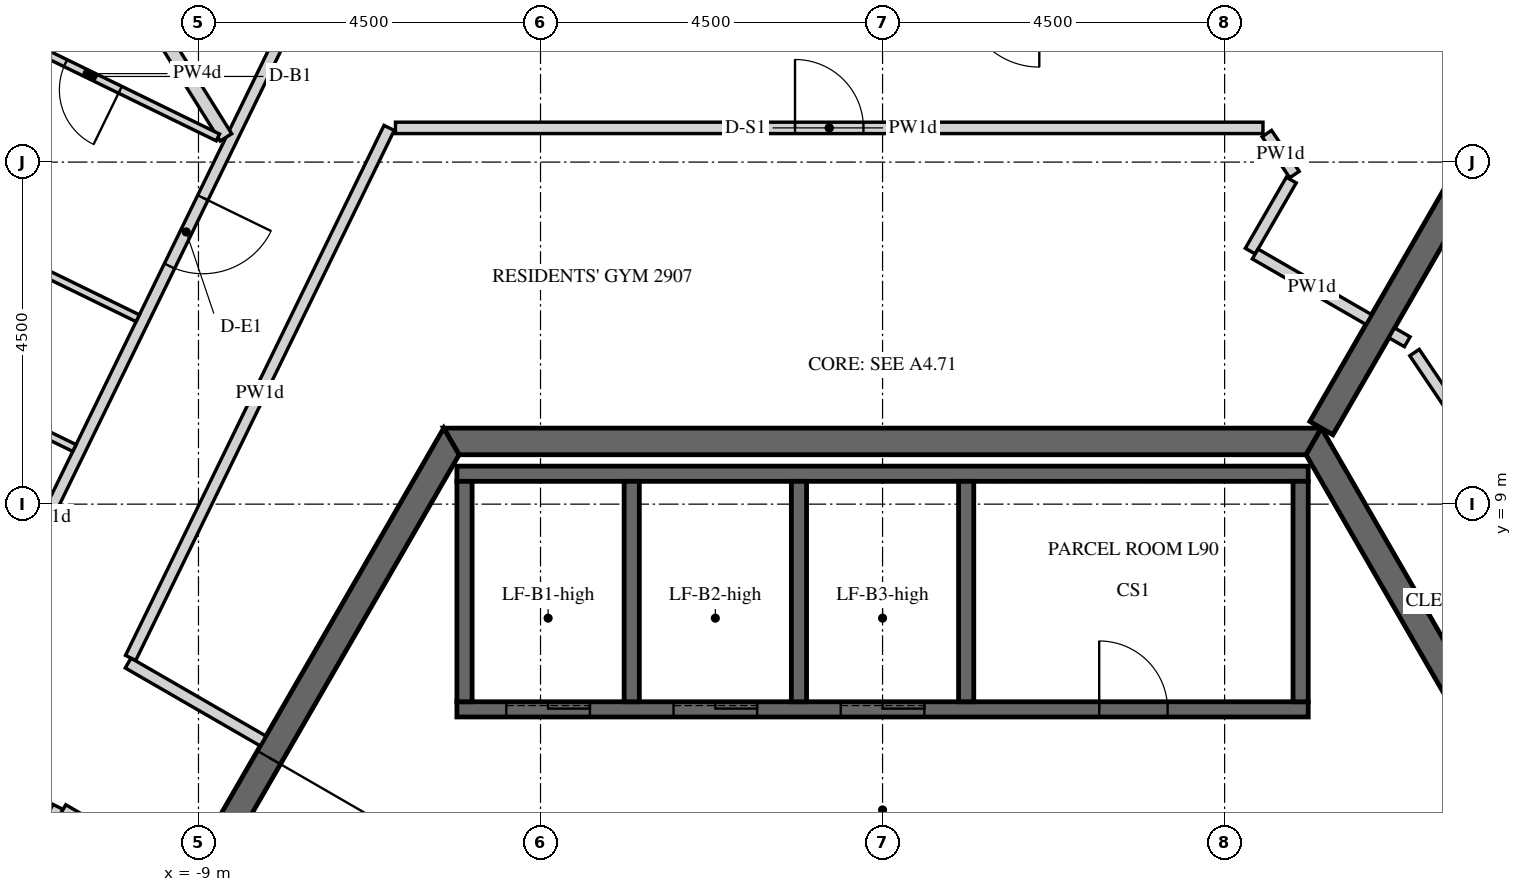
"""IFC4 building model, lengths in metres.
Left out: names, types, materials, properties, quantities, classifications, styles, units other than length and angle.
Written with IfcOpenShell. Run it as: python <this file> out.ifc"""

import sys

from ifc_helpers import new_model, si_unit, direction, frame, frame_2d, origin, place, context, subcontext, project, spatial, polyline, rectangle, outline, extrude, element, fill, save


model = new_model("IFC4")
c1 = context("Model", 3, precision=1e-05, world=origin(), true_north=direction((0.0, 1.0)))
c2 = subcontext(c1, "Body", "Model", "MODEL_VIEW")
j1 = project(units=[si_unit("LENGTHUNIT", "METRE"), si_unit("PLANEANGLEUNIT", "RADIAN")], contexts=[c1])
p1 = place(None, origin())
s1 = spatial("IfcSite", under=j1, at=p1, CompositionType="ELEMENT")
p2 = place(p1, origin())
s2 = spatial("IfcBuilding", under=s1, at=p2, CompositionType="ELEMENT")
p3 = place(p2, frame((0.0, 0.0, 372.9)))
s3 = spatial("IfcBuildingStorey", under=s2, at=p3, CompositionType="ELEMENT", Elevation=372.9)
p4 = place(p3, frame((-5.673, 9.825, -0.15), z_axis=(0.0, 0.0, 1.0), x_axis=(-0.499995046907, -0.866028263435, 0.0)))
e1 = element("IfcWall", 1, at=p4, inside=s3, PredefinedType="SHEAR", context=c2, shape_type="SweptSolid", body=[
    extrude(outline(polyline([(-0.101, -0.175), (11.446, -0.175), (11.244, 0.175), (0.101, 0.175), (-0.101, -0.175)])), origin(), (0.0, 0.0, 1.0), 3.55),
])
p5 = place(p4, frame((4.801, 0.0, 0.15)))
e2 = element("IfcOpeningElement", 2, at=p5, cuts=e1, PredefinedType="OPENING", context=c2, shape_type="SweptSolid", body=[
    extrude(rectangle(XDim=1.8, YDim=2.4, at=frame_2d((0.9, 1.2))), frame((0.0, 0.185, 0.0), z_axis=(0.0, -1.0, 0.0), x_axis=(1.0, 0.0, 0.0)), (0.0, 0.0, 1.0), 0.37),
])
p6 = place(p3, frame((11.345, 0.0, -0.15), z_axis=(0.0, 0.0, 1.0), x_axis=(-0.499995046907, 0.866028263435, 0.0)))
e3 = element("IfcWall", 3, at=p6, inside=s3, PredefinedType="SHEAR", context=c2, shape_type="SweptSolid", body=[
    extrude(outline(polyline([(-0.101, -0.175), (11.446, -0.175), (11.244, 0.175), (0.101, 0.175), (-0.101, -0.175)])), origin(), (0.0, 0.0, 1.0), 3.55),
])
p7 = place(p6, frame((4.744, 0.0, 0.15)))
e4 = element("IfcOpeningElement", 4, at=p7, cuts=e3, PredefinedType="OPENING", context=c2, shape_type="SweptSolid", body=[
    extrude(rectangle(XDim=1.8, YDim=2.4, at=frame_2d((0.9, 1.2))), frame((0.0, 0.185, 0.0), z_axis=(0.0, -1.0, 0.0), x_axis=(1.0, 0.0, 0.0)), (0.0, 0.0, 1.0), 0.37),
])
p8 = place(p3, frame((5.673, 9.825, -0.15), z_axis=(0.0, 0.0, 1.0), x_axis=(-1.0, 0.0, 0.0)))
e5 = element("IfcWall", 5, at=p8, inside=s3, PredefinedType="SHEAR", context=c2, shape_type="SweptSolid", body=[
    extrude(outline(polyline([(-0.101, -0.175), (11.446, -0.175), (11.244, 0.175), (0.101, 0.175), (-0.101, -0.175)])), origin(), (0.0, 0.0, 1.0), 3.55),
])
p9 = place(p3, frame((5.773, 10.0, -0.15), z_axis=(0.0, 0.0, 1.0), x_axis=(0.500007911273, 0.866020836161, 0.0)))
e6 = element("IfcWall", 6, at=p9, inside=s3, PredefinedType="SHEAR", context=c2, shape_type="SweptSolid", body=[
    extrude(rectangle(XDim=14.51, YDim=0.35, at=frame_2d((7.255, 0.0))), origin(), (0.0, 0.0, 1.0), 3.55),
])
p10 = place(p9, frame((6.355, 0.0, 0.15)))
e7 = element("IfcOpeningElement", 7, at=p10, cuts=e6, PredefinedType="OPENING", context=c2, shape_type="SweptSolid", body=[
    extrude(rectangle(XDim=1.8, YDim=2.4, at=frame_2d((0.9, 1.2))), frame((0.0, 0.185, 0.0), z_axis=(0.0, -1.0, 0.0), x_axis=(1.0, 0.0, 0.0)), (0.0, 0.0, 1.0), 0.37),
])
p11 = place(p3, frame((-5.6, 6.3, -0.25), z_axis=(0.0, 0.0, 1.0), x_axis=(1.0, 0.0, 0.0)))
e8 = element("IfcWall", 8, at=p11, inside=s3, PredefinedType="SHEAR", context=c2, shape_type="SweptSolid", body=[
    extrude(rectangle(XDim=11.2, YDim=0.2, at=frame_2d((5.6, 0.0))), origin(), (0.0, 0.0, 1.0), 3.9),
])
p12 = place(p11, frame((8.45, 0.0, 0.25)))
e9 = element("IfcOpeningElement", 9, at=p12, cuts=e8, PredefinedType="OPENING", context=c2, shape_type="SweptSolid", body=[
    extrude(rectangle(XDim=0.9, YDim=2.1, at=frame_2d((0.45, 1.05))), frame((0.0, 0.11, 0.0), z_axis=(0.0, -1.0, 0.0), x_axis=(1.0, 0.0, 0.0)), (0.0, 0.0, 1.0), 0.22),
])
p13 = place(p11, frame((0.65, 0.0, 0.25)))
e10 = element("IfcOpeningElement", 10, at=p13, cuts=e8, PredefinedType="OPENING", context=c2, shape_type="SweptSolid", body=[
    extrude(rectangle(XDim=1.1, YDim=2.1, at=frame_2d((0.55, 1.05))), frame((0.0, 0.11, 0.0), z_axis=(0.0, -1.0, 0.0), x_axis=(1.0, 0.0, 0.0)), (0.0, 0.0, 1.0), 0.22),
])
p14 = place(p11, frame((2.85, 0.0, 0.25)))
e11 = element("IfcOpeningElement", 11, at=p14, cuts=e8, PredefinedType="OPENING", context=c2, shape_type="SweptSolid", body=[
    extrude(rectangle(XDim=1.1, YDim=2.1, at=frame_2d((0.55, 1.05))), frame((0.0, 0.11, 0.0), z_axis=(0.0, -1.0, 0.0), x_axis=(1.0, 0.0, 0.0)), (0.0, 0.0, 1.0), 0.22),
])
p15 = place(p11, frame((5.05, 0.0, 0.25)))
e12 = element("IfcOpeningElement", 12, at=p15, cuts=e8, PredefinedType="OPENING", context=c2, shape_type="SweptSolid", body=[
    extrude(rectangle(XDim=1.1, YDim=2.1, at=frame_2d((0.55, 1.05))), frame((0.0, 0.11, 0.0), z_axis=(0.0, -1.0, 0.0), x_axis=(1.0, 0.0, 0.0)), (0.0, 0.0, 1.0), 0.22),
])
p16 = place(p3, frame((-5.6, 9.4, -0.25), z_axis=(0.0, 0.0, 1.0), x_axis=(1.0, 0.0, 0.0)))
e13 = element("IfcWall", 13, at=p16, inside=s3, PredefinedType="SHEAR", context=c2, shape_type="SweptSolid", body=[
    extrude(rectangle(XDim=11.2, YDim=0.2, at=frame_2d((5.6, 0.0))), origin(), (0.0, 0.0, 1.0), 3.9),
])
for number, where, z_axis, x_axis in (
    (14, (-5.5, 6.4, -0.25), (0.0, 0.0, 1.0), (0.0, 1.0, 0.0)),
    (15, (-3.3, 6.4, -0.25), (0.0, 0.0, 1.0), (0.0, 1.0, 0.0)),
    (16, (-1.1, 6.4, -0.25), (0.0, 0.0, 1.0), (0.0, 1.0, 0.0)),
    (17, (1.1, 6.4, -0.25), (0.0, 0.0, 1.0), (0.0, 1.0, 0.0)),
    (18, (5.5, 6.4, -0.25), (0.0, 0.0, 1.0), (0.0, 1.0, 0.0)),
):
    element("IfcWall", number, at=place(p3, frame(where, z_axis=z_axis, x_axis=x_axis)), inside=s3, PredefinedType="SHEAR", context=c2, shape_type="SweptSolid", body=[
        extrude(rectangle(XDim=2.9, YDim=0.2, at=frame_2d((1.45, 0.0))), origin(), (0.0, 0.0, 1.0), 3.9),
    ])
p17 = place(p3, frame((-7.653, 15.675, 0.0), z_axis=(0.0, 0.0, 1.0), x_axis=(-0.438369669055, -0.898794767037, 0.0)))
e19 = element("IfcWall", 19, at=p17, inside=s3, PredefinedType="PARTITIONING", context=c2, shape_type="SweptSolid", body=[
    extrude(rectangle(XDim=15.243, YDim=0.15, at=frame_2d((7.621, 0.0))), origin(), (0.0, 0.0, 1.0), 2.47),
])
p18 = place(p17, frame((2.942, 0.0, 0.0)))
e20 = element("IfcOpeningElement", 20, at=p18, cuts=e19, PredefinedType="OPENING", context=c2, shape_type="SweptSolid", body=[
    extrude(rectangle(XDim=1.0, YDim=2.1, at=frame_2d((0.5, 1.05))), frame((0.0, 0.085, 0.0), z_axis=(0.0, -1.0, 0.0), x_axis=(1.0, 0.0, 0.0)), (0.0, 0.0, 1.0), 0.17),
])
p19 = place(p3, frame((-8.15, 5.884, 0.0), z_axis=(0.0, 0.0, 1.0), x_axis=(-0.866007146345, 0.50003162148, 0.0)))
e21 = element("IfcWall", 21, at=p19, inside=s3, PredefinedType="PARTITIONING", context=c2, shape_type="SweptSolid", body=[
    extrude(rectangle(XDim=2.051, YDim=0.15, at=frame_2d((1.025, 0.0))), origin(), (0.0, 0.0, 1.0), 2.47),
])
p20 = place(p3, frame((-9.893, 6.977, 0.0), z_axis=(0.0, 0.0, 1.0), x_axis=(0.438380229518, 0.898789616299, 0.0)))
e22 = element("IfcWall", 22, at=p20, inside=s3, PredefinedType="PARTITIONING", context=c2, shape_type="SweptSolid", body=[
    extrude(rectangle(XDim=7.758, YDim=0.15, at=frame_2d((3.879, 0.0))), origin(), (0.0, 0.0, 1.0), 2.47),
])
p21 = place(p3, frame((-6.408, 13.95, 0.0), z_axis=(0.0, 0.0, 1.0), x_axis=(1.0, 0.0, 0.0)))
e23 = element("IfcWall", 23, at=p21, inside=s3, PredefinedType="PARTITIONING", context=c2, shape_type="SweptSolid", body=[
    extrude(rectangle(XDim=11.413, YDim=0.15, at=frame_2d((5.707, 0.0))), origin(), (0.0, 0.0, 1.0), 2.47),
])
p22 = place(p21, frame((5.257, 0.0, 0.0)))
e24 = element("IfcOpeningElement", 24, at=p22, cuts=e23, PredefinedType="OPENING", context=c2, shape_type="SweptSolid", body=[
    extrude(rectangle(XDim=0.9, YDim=2.1, at=frame_2d((0.45, 1.05))), frame((0.0, 0.085, 0.0), z_axis=(0.0, -1.0, 0.0), x_axis=(1.0, 0.0, 0.0)), (0.0, 0.0, 1.0), 0.17),
])
p23 = place(p3, frame((5.055, 13.875, 0.0), z_axis=(0.0, 0.0, 1.0), x_axis=(0.559111656251, -0.829092368705, 0.0)))
e25 = element("IfcWall", 25, at=p23, inside=s3, PredefinedType="PARTITIONING", context=c2, shape_type="SweptSolid", body=[
    extrude(rectangle(XDim=0.65, YDim=0.15, at=frame_2d((0.325, 0.0))), origin(), (0.0, 0.0, 1.0), 2.47),
])
p24 = place(p3, frame((5.377, 13.264, 0.0), z_axis=(0.0, 0.0, 1.0), x_axis=(-0.499957341738, -0.866050031143, 0.0)))
e26 = element("IfcWall", 26, at=p24, inside=s3, PredefinedType="PARTITIONING", context=c2, shape_type="SweptSolid", body=[
    extrude(rectangle(XDim=1.08, YDim=0.15, at=frame_2d((0.54, 0.0))), origin(), (0.0, 0.0, 1.0), 2.47),
])
p25 = place(p3, frame((4.902, 12.291, 0.0), z_axis=(0.0, 0.0, 1.0), x_axis=(0.866074815912, -0.499914405916, 0.0)))
e27 = element("IfcWall", 27, at=p25, inside=s3, PredefinedType="PARTITIONING", context=c2, shape_type="SweptSolid", body=[
    extrude(rectangle(XDim=1.725, YDim=0.15, at=frame_2d((0.862, 0.0))), origin(), (0.0, 0.0, 1.0), 2.47),
])
p26 = place(p3, frame((-13.021, 0.564, 0.0), z_axis=(0.0, 0.0, 1.0), x_axis=(0.438343062662, 0.8988077433, 0.0)))
e28 = element("IfcWall", 28, at=p26, inside=s3, PredefinedType="PARTITIONING", context=c2, shape_type="SweptSolid", body=[
    extrude(rectangle(XDim=4.955, YDim=0.15, at=frame_2d((2.478, 0.0))), origin(), (0.0, 0.0, 1.0), 2.47),
])
p27 = place(p26, frame((2.028, 0.0, 0.0)))
e29 = element("IfcOpeningElement", 29, at=p27, cuts=e28, PredefinedType="OPENING", context=c2, shape_type="SweptSolid", body=[
    extrude(rectangle(XDim=0.9, YDim=2.1, at=frame_2d((0.45, 1.05))), frame((0.0, 0.085, 0.0), z_axis=(0.0, -1.0, 0.0), x_axis=(1.0, 0.0, 0.0)), (0.0, 0.0, 1.0), 0.17),
])
p28 = place(p3, frame((-10.783, 4.98, 0.0), z_axis=(0.0, 0.0, 1.0), x_axis=(0.866007702746, -0.500030657845, 0.0)))
e30 = element("IfcWall", 30, at=p28, inside=s3, PredefinedType="PARTITIONING", context=c2, shape_type="SweptSolid", body=[
    extrude(rectangle(XDim=1.829, YDim=0.15, at=frame_2d((0.914, 0.0))), origin(), (0.0, 0.0, 1.0), 2.47),
])
p29 = place(p3, frame((6.699, 11.254, 0.0), z_axis=(0.0, 0.0, 1.0), x_axis=(0.865544827262, -0.500831460673, 0.0)))
e31 = element("IfcWall", 31, at=p29, inside=s3, PredefinedType="PARTITIONING", context=c2, shape_type="SweptSolid", body=[
    extrude(rectangle(XDim=0.235, YDim=0.15, at=frame_2d((0.117, 0.0))), origin(), (0.0, 0.0, 1.0), 2.47),
])
p30 = place(p3, frame((6.999, 10.994, 0.0), z_axis=(0.0, 0.0, 1.0), x_axis=(0.55918759866, -0.82904115067, 0.0)))
e32 = element("IfcWall", 32, at=p30, inside=s3, PredefinedType="PARTITIONING", context=c2, shape_type="SweptSolid", body=[
    extrude(rectangle(XDim=5.013, YDim=0.15, at=frame_2d((2.506, 0.0))), origin(), (0.0, 0.0, 1.0), 2.47),
])
p31 = place(p30, frame((2.057, 0.0, 0.0)))
e33 = element("IfcOpeningElement", 33, at=p31, cuts=e32, PredefinedType="OPENING", context=c2, shape_type="SweptSolid", body=[
    extrude(rectangle(XDim=0.9, YDim=2.1, at=frame_2d((0.45, 1.05))), frame((0.0, 0.085, 0.0), z_axis=(0.0, -1.0, 0.0), x_axis=(1.0, 0.0, 0.0)), (0.0, 0.0, 1.0), 0.17),
])
p32 = place(p3, frame((-10.402, 16.647, 0.0), z_axis=(0.0, 0.0, 1.0), x_axis=(0.529853827573, -0.84808898201, 0.0)))
e34 = element("IfcWall", 34, at=p32, inside=s3, PredefinedType="PARTITIONING", context=c2, shape_type="SweptSolid", body=[
    extrude(rectangle(XDim=3.327, YDim=0.18, at=frame_2d((1.664, 0.0))), origin(), (0.0, 0.0, 1.0), 2.47),
])
p33 = place(p3, frame((-10.632, 9.738, 0.0), z_axis=(0.0, 0.0, 1.0), x_axis=(-0.898787574002, 0.438384416717, 0.0)))
e35 = element("IfcWall", 35, at=p33, inside=s3, PredefinedType="PARTITIONING", context=c2, shape_type="SweptSolid", body=[
    extrude(rectangle(XDim=3.925, YDim=0.1, at=frame_2d((1.962, 0.0))), origin(), (0.0, 0.0, 1.0), 2.47),
])
p34 = place(p3, frame((-13.327, 13.167, 0.0), z_axis=(0.0, 0.0, 1.0), x_axis=(0.898812080899, -0.438334168449, 0.0)))
e36 = element("IfcWall", 36, at=p34, inside=s3, PredefinedType="PARTITIONING", context=c2, shape_type="SweptSolid", body=[
    extrude(rectangle(XDim=3.925, YDim=0.1, at=frame_2d((1.962, 0.0))), origin(), (0.0, 0.0, 1.0), 2.47),
])
p35 = place(p34, frame((1.6, 0.0, 0.0)))
e37 = element("IfcOpeningElement", 37, at=p35, cuts=e36, PredefinedType="OPENING", context=c2, shape_type="SweptSolid", body=[
    extrude(rectangle(XDim=0.8, YDim=2.1, at=frame_2d((0.4, 1.05))), frame((0.0, 0.06, 0.0), z_axis=(0.0, -1.0, 0.0), x_axis=(1.0, 0.0, 0.0)), (0.0, 0.0, 1.0), 0.12),
])
p36 = place(p3, frame((-8.745, 13.824, 0.0), z_axis=(0.0, 0.0, 1.0), x_axis=(-0.898794787177, 0.43836962776, 0.0)))
e38 = element("IfcWall", 38, at=p36, inside=s3, PredefinedType="PARTITIONING", context=c2, shape_type="SweptSolid", body=[
    extrude(rectangle(XDim=3.83, YDim=0.1, at=frame_2d((1.915, 0.0))), origin(), (0.0, 0.0, 1.0), 2.47),
])
p37 = place(p36, frame((1.43, 0.0, 0.0)))
e39 = element("IfcOpeningElement", 39, at=p37, cuts=e38, PredefinedType="OPENING", context=c2, shape_type="SweptSolid", body=[
    extrude(rectangle(XDim=0.8, YDim=2.1, at=frame_2d((0.4, 1.05))), frame((0.0, 0.06, 0.0), z_axis=(0.0, -1.0, 0.0), x_axis=(1.0, 0.0, 0.0)), (0.0, 0.0, 1.0), 0.12),
])
p38 = place(p5, origin())
e40 = element("IfcDoor", 40, at=p38, inside=s3, OperationType="DOUBLE_DOOR_SINGLE_SWING", PredefinedType="DOOR", context=c2, shape_type="SweptSolid", body=[
    extrude(rectangle(XDim=1.8, YDim=2.4, at=frame_2d((0.9, 1.2))), frame((0.0, 0.025, 0.0), z_axis=(0.0, -1.0, 0.0), x_axis=(1.0, 0.0, 0.0)), (0.0, 0.0, 1.0), 0.05),
])
fill(e2, e40)
p39 = place(p12, origin())
e41 = element("IfcDoor", 41, at=p39, inside=s3, OperationType="SINGLE_SWING_LEFT", PredefinedType="DOOR", context=c2, shape_type="SweptSolid", body=[
    extrude(rectangle(XDim=0.9, YDim=2.1, at=frame_2d((0.45, 1.05))), frame((0.0, 0.025, 0.0), z_axis=(0.0, -1.0, 0.0), x_axis=(1.0, 0.0, 0.0)), (0.0, 0.0, 1.0), 0.05),
])
fill(e9, e41)
p40 = place(p13, origin())
e42 = element("IfcDoor", 42, at=p40, inside=s3, OperationType="SLIDING_TO_LEFT", PredefinedType="DOOR", context=c2, shape_type="SweptSolid", body=[
    extrude(rectangle(XDim=1.1, YDim=2.1, at=frame_2d((0.55, 1.05))), frame((0.0, 0.025, 0.0), z_axis=(0.0, -1.0, 0.0), x_axis=(1.0, 0.0, 0.0)), (0.0, 0.0, 1.0), 0.05),
])
fill(e10, e42)
p41 = place(p14, origin())
e43 = element("IfcDoor", 43, at=p41, inside=s3, OperationType="SLIDING_TO_LEFT", PredefinedType="DOOR", context=c2, shape_type="SweptSolid", body=[
    extrude(rectangle(XDim=1.1, YDim=2.1, at=frame_2d((0.55, 1.05))), frame((0.0, 0.025, 0.0), z_axis=(0.0, -1.0, 0.0), x_axis=(1.0, 0.0, 0.0)), (0.0, 0.0, 1.0), 0.05),
])
fill(e11, e43)
p42 = place(p15, origin())
e44 = element("IfcDoor", 44, at=p42, inside=s3, OperationType="SLIDING_TO_LEFT", PredefinedType="DOOR", context=c2, shape_type="SweptSolid", body=[
    extrude(rectangle(XDim=1.1, YDim=2.1, at=frame_2d((0.55, 1.05))), frame((0.0, 0.025, 0.0), z_axis=(0.0, -1.0, 0.0), x_axis=(1.0, 0.0, 0.0)), (0.0, 0.0, 1.0), 0.05),
])
fill(e12, e44)
p43 = place(p18, origin())
e45 = element("IfcDoor", 45, at=p43, inside=s3, OperationType="SINGLE_SWING_RIGHT", PredefinedType="DOOR", context=c2, shape_type="SweptSolid", body=[
    extrude(rectangle(XDim=1.0, YDim=2.1, at=frame_2d((0.5, 1.05))), frame((0.0, 0.025, 0.0), z_axis=(0.0, -1.0, 0.0), x_axis=(1.0, 0.0, 0.0)), (0.0, 0.0, 1.0), 0.05),
])
fill(e20, e45)
p44 = place(p37, origin())
e46 = element("IfcDoor", 46, at=p44, inside=s3, OperationType="SINGLE_SWING_RIGHT", PredefinedType="DOOR", context=c2, shape_type="SweptSolid", body=[
    extrude(rectangle(XDim=0.8, YDim=2.1, at=frame_2d((0.4, 1.05))), frame((0.0, 0.025, 0.0), z_axis=(0.0, -1.0, 0.0), x_axis=(1.0, 0.0, 0.0)), (0.0, 0.0, 1.0), 0.05),
])
fill(e39, e46)
p45 = place(p22, origin())
e47 = element("IfcDoor", 47, at=p45, inside=s3, OperationType="SINGLE_SWING_RIGHT", PredefinedType="DOOR", context=c2, shape_type="SweptSolid", body=[
    extrude(rectangle(XDim=0.9, YDim=2.1, at=frame_2d((0.45, 1.05))), frame((0.0, 0.025, 0.0), z_axis=(0.0, -1.0, 0.0), x_axis=(1.0, 0.0, 0.0)), (0.0, 0.0, 1.0), 0.05),
])
fill(e24, e47)
save(model, sys.argv[1])
